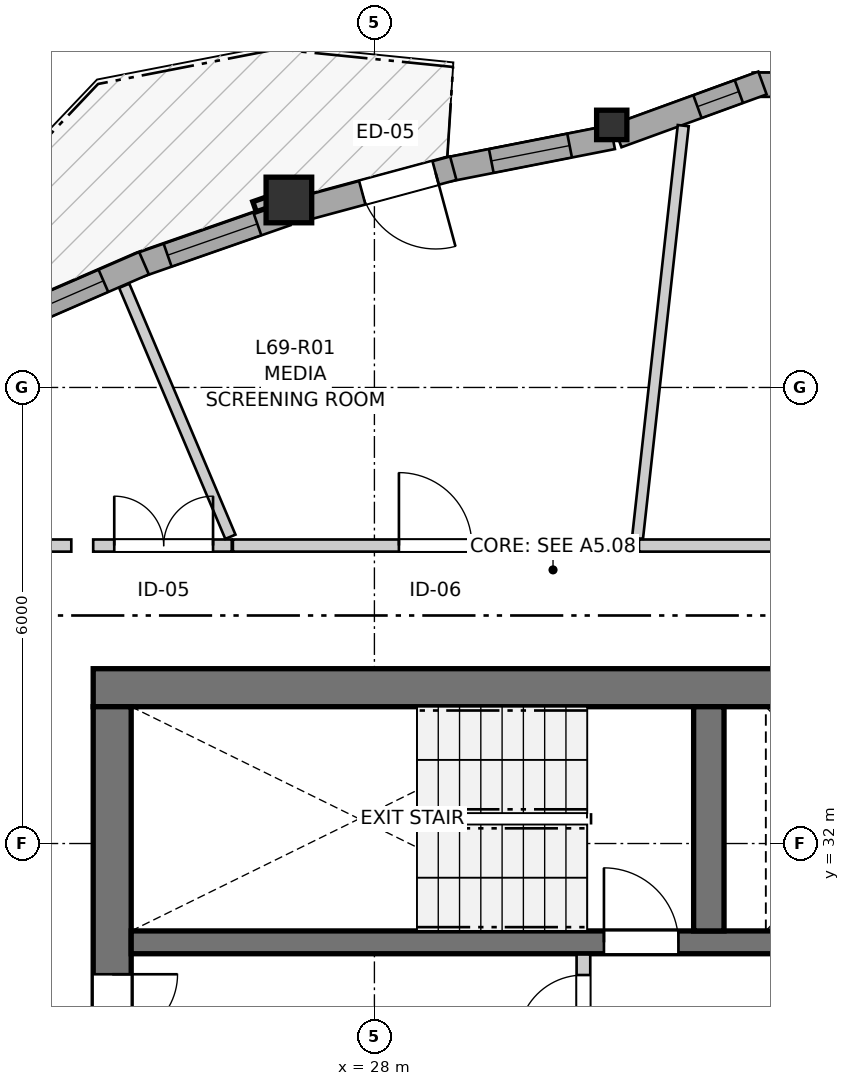
"""IFC4 building model, lengths in metres.
Left out: names, types, materials, properties, quantities, classifications, styles, units other than length and angle.
Written with IfcOpenShell. Run it as: python <this file> out.ifc"""

import sys

from ifc_helpers import new_model, si_unit, direction, frame, frame_2d, origin, origin_2d, place, context, subcontext, project, spatial, rectangle, i_section, extrude, source, transform, mapped, element, fill, save


model = new_model("IFC4")
c1 = context("Model", 3, precision=1e-05, world=origin(), true_north=direction((0.0, 1.0)))
c2 = subcontext(c1, "Body", "Model", "MODEL_VIEW")
j1 = project(units=[si_unit("LENGTHUNIT", "METRE"), si_unit("PLANEANGLEUNIT", "RADIAN")], contexts=[c1])
p1 = place(None, origin())
s1 = spatial("IfcSite", under=j1, at=p1, CompositionType="ELEMENT")
p2 = place(p1, origin())
s2 = spatial("IfcBuilding", under=s1, at=p2, CompositionType="ELEMENT")
p3 = place(p2, frame((0.0, 0.0, 230.8)))
s3 = spatial("IfcBuildingStorey", under=s2, at=p3, CompositionType="ELEMENT", Elevation=230.8)
p4 = place(p3, frame((36.4, 34.05, 0.0), z_axis=(0.0, 0.0, 1.0), x_axis=(-1.0, 0.0, 0.0)))
e1 = element("IfcWall", 1, at=p4, inside=s3, PredefinedType="SHEAR", context=c2, shape_type="SweptSolid", body=[
    extrude(rectangle(XDim=12.1, YDim=0.5, at=frame_2d((6.05, 0.0))), origin(), (0.0, 0.0, 1.0), 2.96),
])
p5 = place(p3, frame((24.55, 33.8, 0.0), z_axis=(0.0, 0.0, 1.0), x_axis=(0.0, -1.0, 0.0)))
e2 = element("IfcWall", 2, at=p5, inside=s3, PredefinedType="SHEAR", context=c2, shape_type="SweptSolid", body=[
    extrude(rectangle(XDim=15.6, YDim=0.5, at=frame_2d((7.8, 0.0))), origin(), (0.0, 0.0, 1.0), 2.96),
])
p6 = place(p5, frame((7.05, 0.0, 0.0)))
e3 = element("IfcOpeningElement", 3, at=p6, cuts=e2, PredefinedType="OPENING", context=c2, shape_type="SweptSolid", body=[
    extrude(rectangle(XDim=1.5, YDim=2.15, at=frame_2d((0.75, 1.075))), frame((0.0, 0.26, 0.0), z_axis=(0.0, -1.0, 0.0), x_axis=(1.0, 0.0, 0.0)), (0.0, 0.0, 1.0), 0.52),
])
p7 = place(p5, frame((3.52, 0.0, 0.0)))
e4 = element("IfcOpeningElement", 4, at=p7, cuts=e2, PredefinedType="OPENING", context=c2, shape_type="SweptSolid", body=[
    extrude(rectangle(XDim=0.86, YDim=2.05, at=frame_2d((0.43, 1.025))), frame((0.0, 0.26, 0.0), z_axis=(0.0, -1.0, 0.0), x_axis=(1.0, 0.0, 0.0)), (0.0, 0.0, 1.0), 0.52),
])
p8 = place(p5, frame((11.22, 0.0, 0.0)))
e5 = element("IfcOpeningElement", 5, at=p8, cuts=e2, PredefinedType="OPENING", context=c2, shape_type="SweptSolid", body=[
    extrude(rectangle(XDim=0.86, YDim=2.05, at=frame_2d((0.43, 1.025))), frame((0.0, 0.26, 0.0), z_axis=(0.0, -1.0, 0.0), x_axis=(1.0, 0.0, 0.0)), (0.0, 0.0, 1.0), 0.52),
])
p9 = place(p3, frame((24.8, 30.7, 0.0), z_axis=(0.0, 0.0, 1.0), x_axis=(1.0, 0.0, 0.0)))
e6 = element("IfcWall", 6, at=p9, inside=s3, PredefinedType="SHEAR", context=c2, shape_type="SweptSolid", body=[
    extrude(rectangle(XDim=11.1, YDim=0.3, at=frame_2d((5.55, 0.0))), origin(), (0.0, 0.0, 1.0), 2.96),
])
p10 = place(p9, frame((6.22, 0.0, 0.0)))
e7 = element("IfcOpeningElement", 7, at=p10, cuts=e6, PredefinedType="OPENING", context=c2, shape_type="SweptSolid", body=[
    extrude(rectangle(XDim=0.98, YDim=2.15, at=frame_2d((0.49, 1.075))), frame((0.0, 0.16, 0.0), z_axis=(0.0, -1.0, 0.0), x_axis=(1.0, 0.0, 0.0)), (0.0, 0.0, 1.0), 0.32),
])
p11 = place(p9, frame((9.15, 0.0, 0.0)))
e8 = element("IfcOpeningElement", 8, at=p11, cuts=e6, PredefinedType="OPENING", context=c2, shape_type="SweptSolid", body=[
    extrude(rectangle(XDim=1.15, YDim=2.15, at=frame_2d((0.575, 1.075))), frame((0.0, 0.16, 0.0), z_axis=(0.0, -1.0, 0.0), x_axis=(1.0, 0.0, 0.0)), (0.0, 0.0, 1.0), 0.32),
])
p12 = place(p3, frame((32.4, 30.85, 0.0), z_axis=(0.0, 0.0, 1.0), x_axis=(0.0, 1.0, 0.0)))
e9 = element("IfcWall", 9, at=p12, inside=s3, PredefinedType="SHEAR", context=c2, shape_type="SweptSolid", body=[
    extrude(rectangle(XDim=2.95, YDim=0.4, at=frame_2d((1.475, 0.0))), origin(), (0.0, 0.0, 1.0), 2.96),
])
m1 = source(origin(), c2, "Body", "SweptSolid", [
    extrude(i_section(OverallWidth=0.398, OverallDepth=0.387, WebThickness=0.019, FlangeThickness=0.03, FilletRadius=0.015, at=origin_2d()), origin(), (0.0, 0.0, 1.0), 2.96),
])
p13 = place(p3, frame((31.123, 41.454, 0.0), z_axis=(0.0, 0.0, 1.0), x_axis=(1.0, 0.0, 0.0)))
e10 = element("IfcColumn", 10, at=p13, inside=s3, PredefinedType="PILASTER", context=c2, shape_type="MappedRepresentation", body=[
    mapped(m1, transform((0.0, 0.0, 0.0), x_axis=(1.0, 0.0, 0.0), y_axis=(0.0, 1.0, 0.0), z_axis=(0.0, 0.0, 1.0), scale=1.0)),
])
m2 = source(origin(), c2, "Body", "SweptSolid", [
    extrude(rectangle(XDim=0.6, YDim=0.6, at=origin_2d()), origin(), (0.0, 0.0, 1.0), 2.96),
])
p14 = place(p3, frame((26.875, 40.467, 0.0), z_axis=(0.0, 0.0, 1.0), x_axis=(1.0, 0.0, 0.0)))
e11 = element("IfcColumn", 11, at=p14, inside=s3, PredefinedType="COLUMN", context=c2, shape_type="MappedRepresentation", body=[
    mapped(m2, transform((0.0, 0.0, 0.0), x_axis=(1.0, 0.0, 0.0), y_axis=(0.0, 1.0, 0.0), z_axis=(0.0, 0.0, 1.0), scale=1.0)),
])
p15 = place(p3, frame((35.068, 41.983, 0.0), z_axis=(0.0, 0.0, 1.0), x_axis=(-1.0, 0.0, 0.0)))
e12 = element("IfcWall", 12, at=p15, inside=s3, PredefinedType="SOLIDWALL", context=c2, shape_type="SweptSolid", body=[
    extrude(rectangle(XDim=2.09, YDim=0.32, at=frame_2d((1.045, 0.0))), origin(), (0.0, 0.0, 1.0), 2.58),
])
p16 = place(p15, frame((0.37, 0.0, 0.82)))
e13 = element("IfcOpeningElement", 13, at=p16, cuts=e12, PredefinedType="OPENING", context=c2, shape_type="SweptSolid", body=[
    extrude(rectangle(XDim=1.35, YDim=1.45, at=frame_2d((0.675, 0.725))), frame((0.0, 0.17, 0.0), z_axis=(0.0, -1.0, 0.0), x_axis=(1.0, 0.0, 0.0)), (0.0, 0.0, 1.0), 0.34),
])
p17 = place(p3, frame((33.106, 42.006, 0.0), z_axis=(0.0, 0.0, 1.0), x_axis=(-0.939691662178, -0.342022777067, 0.0)))
e14 = element("IfcWall", 14, at=p17, inside=s3, PredefinedType="SOLIDWALL", context=c2, shape_type="SweptSolid", body=[
    extrude(rectangle(XDim=2.032, YDim=0.32, at=frame_2d((1.016, 0.0))), origin(), (0.0, 0.0, 1.0), 2.58),
])
p18 = place(p17, frame((0.33, 0.0, 0.82)))
e15 = element("IfcOpeningElement", 15, at=p18, cuts=e14, PredefinedType="OPENING", context=c2, shape_type="SweptSolid", body=[
    extrude(rectangle(XDim=0.58, YDim=1.35, at=frame_2d((0.29, 0.675))), frame((0.0, 0.17, 0.0), z_axis=(0.0, -1.0, 0.0), x_axis=(1.0, 0.0, 0.0)), (0.0, 0.0, 1.0), 0.34),
])
p19 = place(p3, frame((31.134, 41.293, 0.0), z_axis=(0.0, 0.0, 1.0), x_axis=(-0.981246594798, -0.19275663464, 0.0)))
e16 = element("IfcWall", 16, at=p19, inside=s3, PredefinedType="SOLIDWALL", context=c2, shape_type="SweptSolid", body=[
    extrude(rectangle(XDim=2.223, YDim=0.32, at=frame_2d((1.111, 0.0))), origin(), (0.0, 0.0, 1.0), 2.58),
])
p20 = place(p19, frame((0.576, 0.0, 0.82)))
e17 = element("IfcOpeningElement", 17, at=p20, cuts=e16, PredefinedType="OPENING", context=c2, shape_type="SweptSolid", body=[
    extrude(rectangle(XDim=1.05, YDim=1.45, at=frame_2d((0.525, 0.725))), frame((0.0, 0.17, 0.0), z_axis=(0.0, -1.0, 0.0), x_axis=(1.0, 0.0, 0.0)), (0.0, 0.0, 1.0), 0.34),
])
p21 = place(p3, frame((29.037, 40.885, 0.0), z_axis=(0.0, 0.0, 1.0), x_axis=(-0.965439872052, -0.260625887918, 0.0)))
e18 = element("IfcWall", 18, at=p21, inside=s3, PredefinedType="SOLIDWALL", context=c2, shape_type="SweptSolid", body=[
    extrude(rectangle(XDim=2.107, YDim=0.32, at=frame_2d((1.053, 0.0))), origin(), (0.0, 0.0, 1.0), 2.58),
])
p22 = place(p21, frame((0.24, 0.0, 0.0)))
e19 = element("IfcOpeningElement", 19, at=p22, cuts=e18, PredefinedType="OPENING", context=c2, shape_type="SweptSolid", body=[
    extrude(rectangle(XDim=1.0, YDim=2.1, at=frame_2d((0.5, 1.05))), frame((0.0, 0.17, 0.0), z_axis=(0.0, -1.0, 0.0), x_axis=(1.0, 0.0, 0.0)), (0.0, 0.0, 1.0), 0.34),
])
p23 = place(p3, frame((26.843, 40.286, 0.0), z_axis=(0.0, 0.0, 1.0), x_axis=(-0.944109796758, -0.329631144867, 0.0)))
e20 = element("IfcWall", 20, at=p23, inside=s3, PredefinedType="SOLIDWALL", context=c2, shape_type="SweptSolid", body=[
    extrude(rectangle(XDim=2.072, YDim=0.32, at=frame_2d((1.036, 0.0))), origin(), (0.0, 0.0, 1.0), 2.58),
])
p24 = place(p23, frame((0.406, 0.0, 0.82)))
e21 = element("IfcOpeningElement", 21, at=p24, cuts=e20, PredefinedType="OPENING", context=c2, shape_type="SweptSolid", body=[
    extrude(rectangle(XDim=1.25, YDim=1.35, at=frame_2d((0.625, 0.675))), frame((0.0, 0.17, 0.0), z_axis=(0.0, -1.0, 0.0), x_axis=(1.0, 0.0, 0.0)), (0.0, 0.0, 1.0), 0.34),
])
p25 = place(p3, frame((24.969, 39.635, 0.0), z_axis=(0.0, 0.0, 1.0), x_axis=(-0.917099379281, -0.398658661666, 0.0)))
e22 = element("IfcWall", 22, at=p25, inside=s3, PredefinedType="SOLIDWALL", context=c2, shape_type="SweptSolid", body=[
    extrude(rectangle(XDim=2.118, YDim=0.32, at=frame_2d((1.059, 0.0))), origin(), (0.0, 0.0, 1.0), 2.58),
])
p26 = place(p25, frame((0.582, 0.0, 0.82)))
e23 = element("IfcOpeningElement", 23, at=p26, cuts=e22, PredefinedType="OPENING", context=c2, shape_type="SweptSolid", body=[
    extrude(rectangle(XDim=1.25, YDim=1.35, at=frame_2d((0.625, 0.675))), frame((0.0, 0.17, 0.0), z_axis=(0.0, -1.0, 0.0), x_axis=(1.0, 0.0, 0.0)), (0.0, 0.0, 1.0), 0.34),
])
p27 = place(p3, frame((30.75, 27.43, 0.0), z_axis=(0.0, 0.0, 1.0), x_axis=(0.0, 1.0, 0.0)))
e24 = element("IfcWall", 24, at=p27, inside=s3, PredefinedType="PARTITIONING", context=c2, shape_type="SweptSolid", body=[
    extrude(rectangle(XDim=3.11, YDim=0.18, at=frame_2d((1.555, 0.0))), origin(), (0.0, 0.0, 1.0), 2.96),
])
p28 = place(p27, frame((1.98, 0.0, 0.0)))
e25 = element("IfcOpeningElement", 25, at=p28, cuts=e24, PredefinedType="OPENING", context=c2, shape_type="SweptSolid", body=[
    extrude(rectangle(XDim=0.86, YDim=2.05, at=frame_2d((0.43, 1.025))), frame((0.0, 0.1, 0.0), z_axis=(0.0, -1.0, 0.0), x_axis=(1.0, 0.0, 0.0)), (0.0, 0.0, 1.0), 0.2),
])
p29 = place(p3, frame((26.138, 35.92, 0.0), z_axis=(0.0, 0.0, 1.0), x_axis=(1.0, 0.0, 0.0)))
e26 = element("IfcWall", 26, at=p29, inside=s3, PredefinedType="PARTITIONING", context=c2, shape_type="SweptSolid", body=[
    extrude(rectangle(XDim=5.328, YDim=0.16, at=frame_2d((2.664, 0.0))), origin(), (0.0, 0.0, 1.0), 2.96),
])
p30 = place(p29, frame((2.185, 0.0, 0.0)))
e27 = element("IfcOpeningElement", 27, at=p30, cuts=e26, PredefinedType="OPENING", context=c2, shape_type="SweptSolid", body=[
    extrude(rectangle(XDim=0.96, YDim=2.1, at=frame_2d((0.48, 1.05))), frame((0.0, 0.09, 0.0), z_axis=(0.0, -1.0, 0.0), x_axis=(1.0, 0.0, 0.0)), (0.0, 0.0, 1.0), 0.18),
])
p31 = place(p3, frame((31.481, 35.92, 0.0), z_axis=(0.0, 0.0, 1.0), x_axis=(1.0, 0.0, 0.0)))
e28 = element("IfcWall", 28, at=p31, inside=s3, PredefinedType="PARTITIONING", context=c2, shape_type="SweptSolid", body=[
    extrude(rectangle(XDim=4.919, YDim=0.16, at=frame_2d((2.459, 0.0))), origin(), (0.0, 0.0, 1.0), 2.598),
])
p32 = place(p31, frame((1.965, 0.0, 0.0)))
e29 = element("IfcOpeningElement", 29, at=p32, cuts=e28, PredefinedType="OPENING", context=c2, shape_type="SweptSolid", body=[
    extrude(rectangle(XDim=0.96, YDim=2.1, at=frame_2d((0.48, 1.05))), frame((0.0, 0.09, 0.0), z_axis=(0.0, -1.0, 0.0), x_axis=(1.0, 0.0, 0.0)), (0.0, 0.0, 1.0), 0.18),
])
p33 = place(p3, frame((24.3, 35.92, 0.0), z_axis=(0.0, 0.0, 1.0), x_axis=(1.0, 0.0, 0.0)))
e30 = element("IfcWall", 30, at=p33, inside=s3, PredefinedType="PARTITIONING", context=c2, shape_type="SweptSolid", body=[
    extrude(rectangle(XDim=1.823, YDim=0.16, at=frame_2d((0.912, 0.0))), origin(), (0.0, 0.0, 1.0), 2.96),
])
p34 = place(p33, frame((0.277, 0.0, 0.0)))
e31 = element("IfcOpeningElement", 31, at=p34, cuts=e30, PredefinedType="OPENING", context=c2, shape_type="SweptSolid", body=[
    extrude(rectangle(XDim=1.3, YDim=2.1, at=frame_2d((0.65, 1.05))), frame((0.0, 0.09, 0.0), z_axis=(0.0, -1.0, 0.0), x_axis=(1.0, 0.0, 0.0)), (0.0, 0.0, 1.0), 0.18),
])
p35 = place(p3, frame((31.462, 36.016, 0.0), z_axis=(0.0, 0.0, 1.0), x_axis=(0.11018132109, 0.993911503346, 0.0)))
e32 = element("IfcWall", 32, at=p35, inside=s3, PredefinedType="PARTITIONING", context=c2, shape_type="SweptSolid", body=[
    extrude(rectangle(XDim=5.462, YDim=0.145, at=frame_2d((2.731, 0.0))), origin(), (0.0, 0.0, 1.0), 2.96),
])
p36 = place(p3, frame((24.708, 39.338, 0.0), z_axis=(0.0, 0.0, 1.0), x_axis=(0.389551136954, -0.921004838043, 0.0)))
e33 = element("IfcWall", 33, at=p36, inside=s3, PredefinedType="PARTITIONING", context=c2, shape_type="SweptSolid", body=[
    extrude(rectangle(XDim=3.585, YDim=0.145, at=frame_2d((1.793, 0.0))), origin(), (0.0, 0.0, 1.0), 2.96),
])
p37 = place(p3, frame((22.68, 35.92, 0.0), z_axis=(0.0, 0.0, 1.0), x_axis=(1.0, 0.0, 0.0)))
e34 = element("IfcWall", 34, at=p37, inside=s3, PredefinedType="PARTITIONING", context=c2, shape_type="SweptSolid", body=[
    extrude(rectangle(XDim=1.332, YDim=0.16, at=frame_2d((0.666, 0.0))), origin(), (0.0, 0.0, 1.0), 2.96),
])
m3 = source(origin(), c2, "Body", "SweptSolid", [
    extrude(rectangle(XDim=0.58, YDim=1.35, at=frame_2d((0.29, 0.675))), frame((0.0, 0.03, 0.0), z_axis=(0.0, -1.0, 0.0), x_axis=(1.0, 0.0, 0.0)), (0.0, 0.0, 1.0), 0.06),
])
p38 = place(p18, origin())
e35 = element("IfcWindow", 35, at=p38, inside=s3, PartitioningType="SINGLE_PANEL", PredefinedType="WINDOW", context=c2, shape_type="MappedRepresentation", body=[
    mapped(m3, transform((0.0, 0.0, 0.0), x_axis=(1.0, 0.0, 0.0), y_axis=(0.0, 1.0, 0.0), z_axis=(0.0, 0.0, 1.0), scale=1.0)),
])
fill(e15, e35)
m4 = source(origin(), c2, "Body", "SweptSolid", [
    extrude(rectangle(XDim=1.05, YDim=1.45, at=frame_2d((0.525, 0.725))), frame((0.0, 0.03, 0.0), z_axis=(0.0, -1.0, 0.0), x_axis=(1.0, 0.0, 0.0)), (0.0, 0.0, 1.0), 0.06),
])
p39 = place(p20, origin())
e36 = element("IfcWindow", 36, at=p39, inside=s3, PartitioningType="SINGLE_PANEL", PredefinedType="WINDOW", context=c2, shape_type="MappedRepresentation", body=[
    mapped(m4, transform((0.0, 0.0, 0.0), x_axis=(1.0, 0.0, 0.0), y_axis=(0.0, 1.0, 0.0), z_axis=(0.0, 0.0, 1.0), scale=1.0)),
])
fill(e17, e36)
m5 = source(origin(), c2, "Body", "SweptSolid", [
    extrude(rectangle(XDim=1.25, YDim=1.35, at=frame_2d((0.625, 0.675))), frame((0.0, 0.03, 0.0), z_axis=(0.0, -1.0, 0.0), x_axis=(1.0, 0.0, 0.0)), (0.0, 0.0, 1.0), 0.06),
])
p40 = place(p24, origin())
e37 = element("IfcWindow", 37, at=p40, inside=s3, PartitioningType="SINGLE_PANEL", PredefinedType="WINDOW", context=c2, shape_type="MappedRepresentation", body=[
    mapped(m5, transform((0.0, 0.0, 0.0), x_axis=(1.0, 0.0, 0.0), y_axis=(0.0, 1.0, 0.0), z_axis=(0.0, 0.0, 1.0), scale=1.0)),
])
fill(e21, e37)
p41 = place(p26, origin())
e38 = element("IfcWindow", 38, at=p41, inside=s3, PartitioningType="SINGLE_PANEL", PredefinedType="WINDOW", context=c2, shape_type="MappedRepresentation", body=[
    mapped(m5, transform((0.0, 0.0, 0.0), x_axis=(1.0, 0.0, 0.0), y_axis=(0.0, 1.0, 0.0), z_axis=(0.0, 0.0, 1.0), scale=1.0)),
])
fill(e23, e38)
m6 = source(origin(), c2, "Body", "SweptSolid", [
    extrude(rectangle(XDim=1.0, YDim=2.1, at=frame_2d((0.5, 1.05))), frame((0.0, 0.025, 0.0), z_axis=(0.0, -1.0, 0.0), x_axis=(1.0, 0.0, 0.0)), (0.0, 0.0, 1.0), 0.05),
])
p42 = place(p22, origin())
e39 = element("IfcDoor", 39, at=p42, inside=s3, OperationType="SINGLE_SWING_LEFT", PredefinedType="DOOR", context=c2, shape_type="MappedRepresentation", body=[
    mapped(m6, transform((0.0, 0.0, 0.0), x_axis=(1.0, 0.0, 0.0), y_axis=(0.0, 1.0, 0.0), z_axis=(0.0, 0.0, 1.0), scale=1.0)),
])
fill(e19, e39)
m7 = source(origin(), c2, "Body", "SweptSolid", [
    extrude(rectangle(XDim=0.98, YDim=2.15, at=frame_2d((0.49, 1.075))), frame((0.0, 0.025, 0.0), z_axis=(0.0, -1.0, 0.0), x_axis=(1.0, 0.0, 0.0)), (0.0, 0.0, 1.0), 0.05),
])
p43 = place(p10, origin())
e40 = element("IfcDoor", 40, at=p43, inside=s3, OperationType="SINGLE_SWING_LEFT", PredefinedType="DOOR", context=c2, shape_type="MappedRepresentation", body=[
    mapped(m7, transform((0.0, 0.0, 0.0), x_axis=(1.0, 0.0, 0.0), y_axis=(0.0, 1.0, 0.0), z_axis=(0.0, 0.0, 1.0), scale=1.0)),
])
fill(e7, e40)
m8 = source(origin(), c2, "Body", "SweptSolid", [
    extrude(rectangle(XDim=0.86, YDim=2.05, at=frame_2d((0.43, 1.025))), frame((0.0, 0.025, 0.0), z_axis=(0.0, -1.0, 0.0), x_axis=(1.0, 0.0, 0.0)), (0.0, 0.0, 1.0), 0.05),
])
p44 = place(p7, origin())
e41 = element("IfcDoor", 41, at=p44, inside=s3, OperationType="SINGLE_SWING_LEFT", PredefinedType="DOOR", context=c2, shape_type="MappedRepresentation", body=[
    mapped(m8, transform((0.0, 0.0, 0.0), x_axis=(1.0, 0.0, 0.0), y_axis=(0.0, 1.0, 0.0), z_axis=(0.0, 0.0, 1.0), scale=1.0)),
])
fill(e4, e41)
p45 = place(p28, origin())
e42 = element("IfcDoor", 42, at=p45, inside=s3, OperationType="SINGLE_SWING_LEFT", PredefinedType="DOOR", context=c2, shape_type="MappedRepresentation", body=[
    mapped(m8, transform((0.0, 0.0, 0.0), x_axis=(1.0, 0.0, 0.0), y_axis=(0.0, 1.0, 0.0), z_axis=(0.0, 0.0, 1.0), scale=1.0)),
])
fill(e25, e42)
m9 = source(origin(), c2, "Body", "SweptSolid", [
    extrude(rectangle(XDim=0.96, YDim=2.1, at=frame_2d((0.48, 1.05))), frame((0.0, 0.025, 0.0), z_axis=(0.0, -1.0, 0.0), x_axis=(1.0, 0.0, 0.0)), (0.0, 0.0, 1.0), 0.05),
])
p46 = place(p30, origin())
e43 = element("IfcDoor", 43, at=p46, inside=s3, OperationType="SINGLE_SWING_LEFT", PredefinedType="DOOR", context=c2, shape_type="MappedRepresentation", body=[
    mapped(m9, transform((0.0, 0.0, 0.0), x_axis=(1.0, 0.0, 0.0), y_axis=(0.0, 1.0, 0.0), z_axis=(0.0, 0.0, 1.0), scale=1.0)),
])
fill(e27, e43)
m10 = source(origin(), c2, "Body", "SweptSolid", [
    extrude(rectangle(XDim=1.3, YDim=2.1, at=frame_2d((0.65, 1.05))), frame((0.0, 0.025, 0.0), z_axis=(0.0, -1.0, 0.0), x_axis=(1.0, 0.0, 0.0)), (0.0, 0.0, 1.0), 0.05),
])
p47 = place(p34, origin())
e44 = element("IfcDoor", 44, at=p47, inside=s3, OperationType="DOUBLE_DOOR_SINGLE_SWING", PredefinedType="DOOR", context=c2, shape_type="MappedRepresentation", body=[
    mapped(m10, transform((0.0, 0.0, 0.0), x_axis=(1.0, 0.0, 0.0), y_axis=(0.0, 1.0, 0.0), z_axis=(0.0, 0.0, 1.0), scale=1.0)),
])
fill(e31, e44)
save(model, sys.argv[1])
